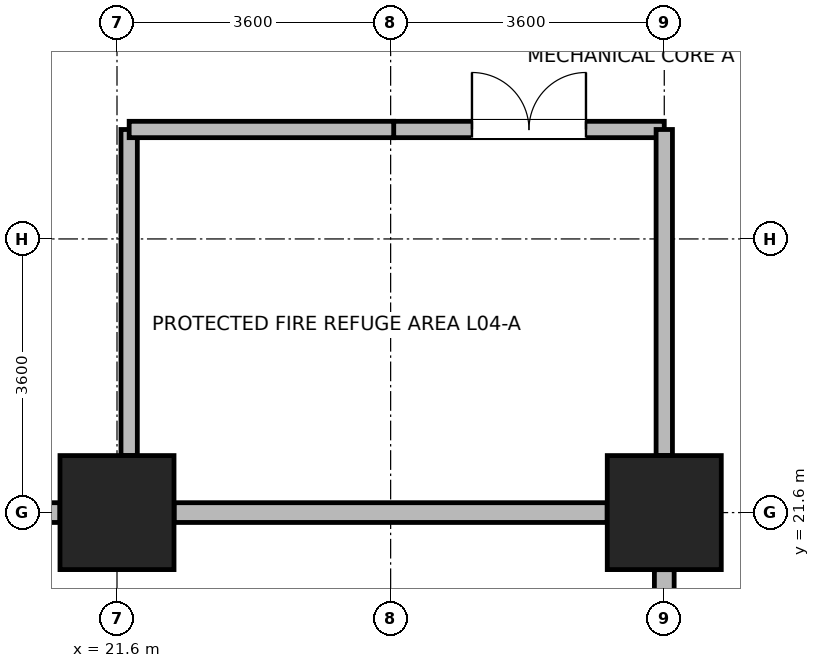
"""IFC4 building model, lengths in metres.
Left out: names, types, materials, properties, quantities, classifications, styles, units other than length and angle.
Written with IfcOpenShell. Run it as: python <this file> out.ifc"""

import sys

from ifc_helpers import new_model, si_unit, direction, frame, frame_2d, origin, origin_2d, place, context, subcontext, project, spatial, rectangle, extrude, source, transform, mapped, element, fill, save


model = new_model("IFC4")
c1 = context("Model", 3, precision=1e-05, world=origin(), true_north=direction((0.0, 1.0)))
c2 = subcontext(c1, "Body", "Model", "MODEL_VIEW")
j1 = project(units=[si_unit("LENGTHUNIT", "METRE"), si_unit("PLANEANGLEUNIT", "RADIAN")], contexts=[c1])
p1 = place(None, origin())
s1 = spatial("IfcSite", under=j1, at=p1, CompositionType="ELEMENT")
p2 = place(p1, origin())
s2 = spatial("IfcBuilding", under=s1, at=p2, CompositionType="ELEMENT")
p3 = place(p2, frame((0.0, 0.0, 19.8)))
s3 = spatial("IfcBuildingStorey", under=s2, at=p3, CompositionType="ELEMENT", Elevation=19.8)
m1 = source(origin(), c2, "Body", "SweptSolid", [
    extrude(rectangle(XDim=1.5, YDim=1.5, at=origin_2d()), origin(), (0.0, 0.0, 1.0), 5.5),
])
for number, where, z_axis, x_axis in (
    (1, (21.6, 21.6, 0.0), (0.0, 0.0, 1.0), (1.0, 0.0, 0.0)),
    (2, (28.8, 21.6, 0.0), (0.0, 0.0, 1.0), (1.0, 0.0, 0.0)),
):
    element("IfcColumn", number, at=place(p3, frame(where, z_axis=z_axis, x_axis=x_axis)), inside=s3, PredefinedType="COLUMN", context=c2, shape_type="MappedRepresentation", body=[
        mapped(m1, transform((0.0, 0.0, 0.0), x_axis=(1.0, 0.0, 0.0), y_axis=(0.0, 1.0, 0.0), z_axis=(0.0, 0.0, 1.0), scale=1.0)),
    ])
p4 = place(p3, frame((20.849, 21.6, 0.0), z_axis=(0.0, 0.0, 1.0), x_axis=(-1.0, 0.0, 0.0)))
e3 = element("IfcWall", 3, at=p4, inside=s3, PredefinedType="STANDARD", context=c2, shape_type="SweptSolid", body=[
    extrude(rectangle(XDim=5.698, YDim=0.26, at=frame_2d((2.849, 0.0))), origin(), (0.0, 0.0, 1.0), 3.26),
])
p5 = place(p3, frame((28.049, 21.6, 0.0), z_axis=(0.0, 0.0, 1.0), x_axis=(-1.0, 0.0, 0.0)))
e4 = element("IfcWall", 4, at=p5, inside=s3, PredefinedType="STANDARD", context=c2, shape_type="SweptSolid", body=[
    extrude(rectangle(XDim=5.698, YDim=0.26, at=frame_2d((2.849, 0.0))), origin(), (0.0, 0.0, 1.0), 3.26),
])
p6 = place(p3, frame((28.8, 1.67, 0.0), z_axis=(0.0, 0.0, 1.0), x_axis=(0.0, 1.0, 0.0)))
e5 = element("IfcWall", 5, at=p6, inside=s3, PredefinedType="STANDARD", context=c2, shape_type="SweptSolid", body=[
    extrude(rectangle(XDim=19.179, YDim=0.26, at=frame_2d((9.59, 0.0))), origin(), (0.0, 0.0, 1.0), 5.06),
])
p7 = place(p3, frame((25.24, 26.64, 0.0), z_axis=(0.0, 0.0, 1.0), x_axis=(1.0, 0.0, 0.0)))
e6 = element("IfcWall", 6, at=p7, inside=s3, PredefinedType="PARTITIONING", context=c2, shape_type="SweptSolid", body=[
    extrude(rectangle(XDim=3.56, YDim=0.215, at=frame_2d((1.78, 0.0))), origin(), (0.0, 0.0, 1.0), 5.06),
])
p8 = place(p7, frame((1.03, 0.0, 0.0)))
e7 = element("IfcOpeningElement", 7, at=p8, cuts=e6, PredefinedType="OPENING", context=c2, shape_type="SweptSolid", body=[
    extrude(rectangle(XDim=1.5, YDim=2.1, at=frame_2d((0.75, 1.05))), frame((0.0, 0.118, 0.0), z_axis=(0.0, -1.0, 0.0), x_axis=(1.0, 0.0, 0.0)), (0.0, 0.0, 1.0), 0.235),
])
p9 = place(p3, frame((21.76, 22.35, 0.0), z_axis=(0.0, 0.0, 1.0), x_axis=(0.0, 1.0, 0.0)))
e8 = element("IfcWall", 8, at=p9, inside=s3, PredefinedType="PARTITIONING", context=c2, shape_type="SweptSolid", body=[
    extrude(rectangle(XDim=4.29, YDim=0.215, at=frame_2d((2.145, 0.0))), origin(), (0.0, 0.0, 1.0), 3.46),
])
p10 = place(p3, frame((28.8, 22.35, 0.0), z_axis=(0.0, 0.0, 1.0), x_axis=(0.0, 1.0, 0.0)))
e9 = element("IfcWall", 9, at=p10, inside=s3, PredefinedType="PARTITIONING", context=c2, shape_type="SweptSolid", body=[
    extrude(rectangle(XDim=4.29, YDim=0.215, at=frame_2d((2.145, 0.0))), origin(), (0.0, 0.0, 1.0), 3.26),
])
p11 = place(p3, frame((21.76, 26.64, 0.0), z_axis=(0.0, 0.0, 1.0), x_axis=(1.0, 0.0, 0.0)))
e10 = element("IfcWall", 10, at=p11, inside=s3, PredefinedType="PARTITIONING", context=c2, shape_type="SweptSolid", body=[
    extrude(rectangle(XDim=3.48, YDim=0.215, at=frame_2d((1.74, 0.0))), origin(), (0.0, 0.0, 1.0), 5.06),
])
p12 = place(p8, origin())
e11 = element("IfcDoor", 11, at=p12, inside=s3, OperationType="DOUBLE_DOOR_SINGLE_SWING", PredefinedType="DOOR", context=c2, shape_type="SweptSolid", body=[
    extrude(rectangle(XDim=1.5, YDim=2.1, at=frame_2d((0.75, 1.05))), frame((0.0, 0.025, 0.0), z_axis=(0.0, -1.0, 0.0), x_axis=(1.0, 0.0, 0.0)), (0.0, 0.0, 1.0), 0.05),
])
fill(e7, e11)
save(model, sys.argv[1])
